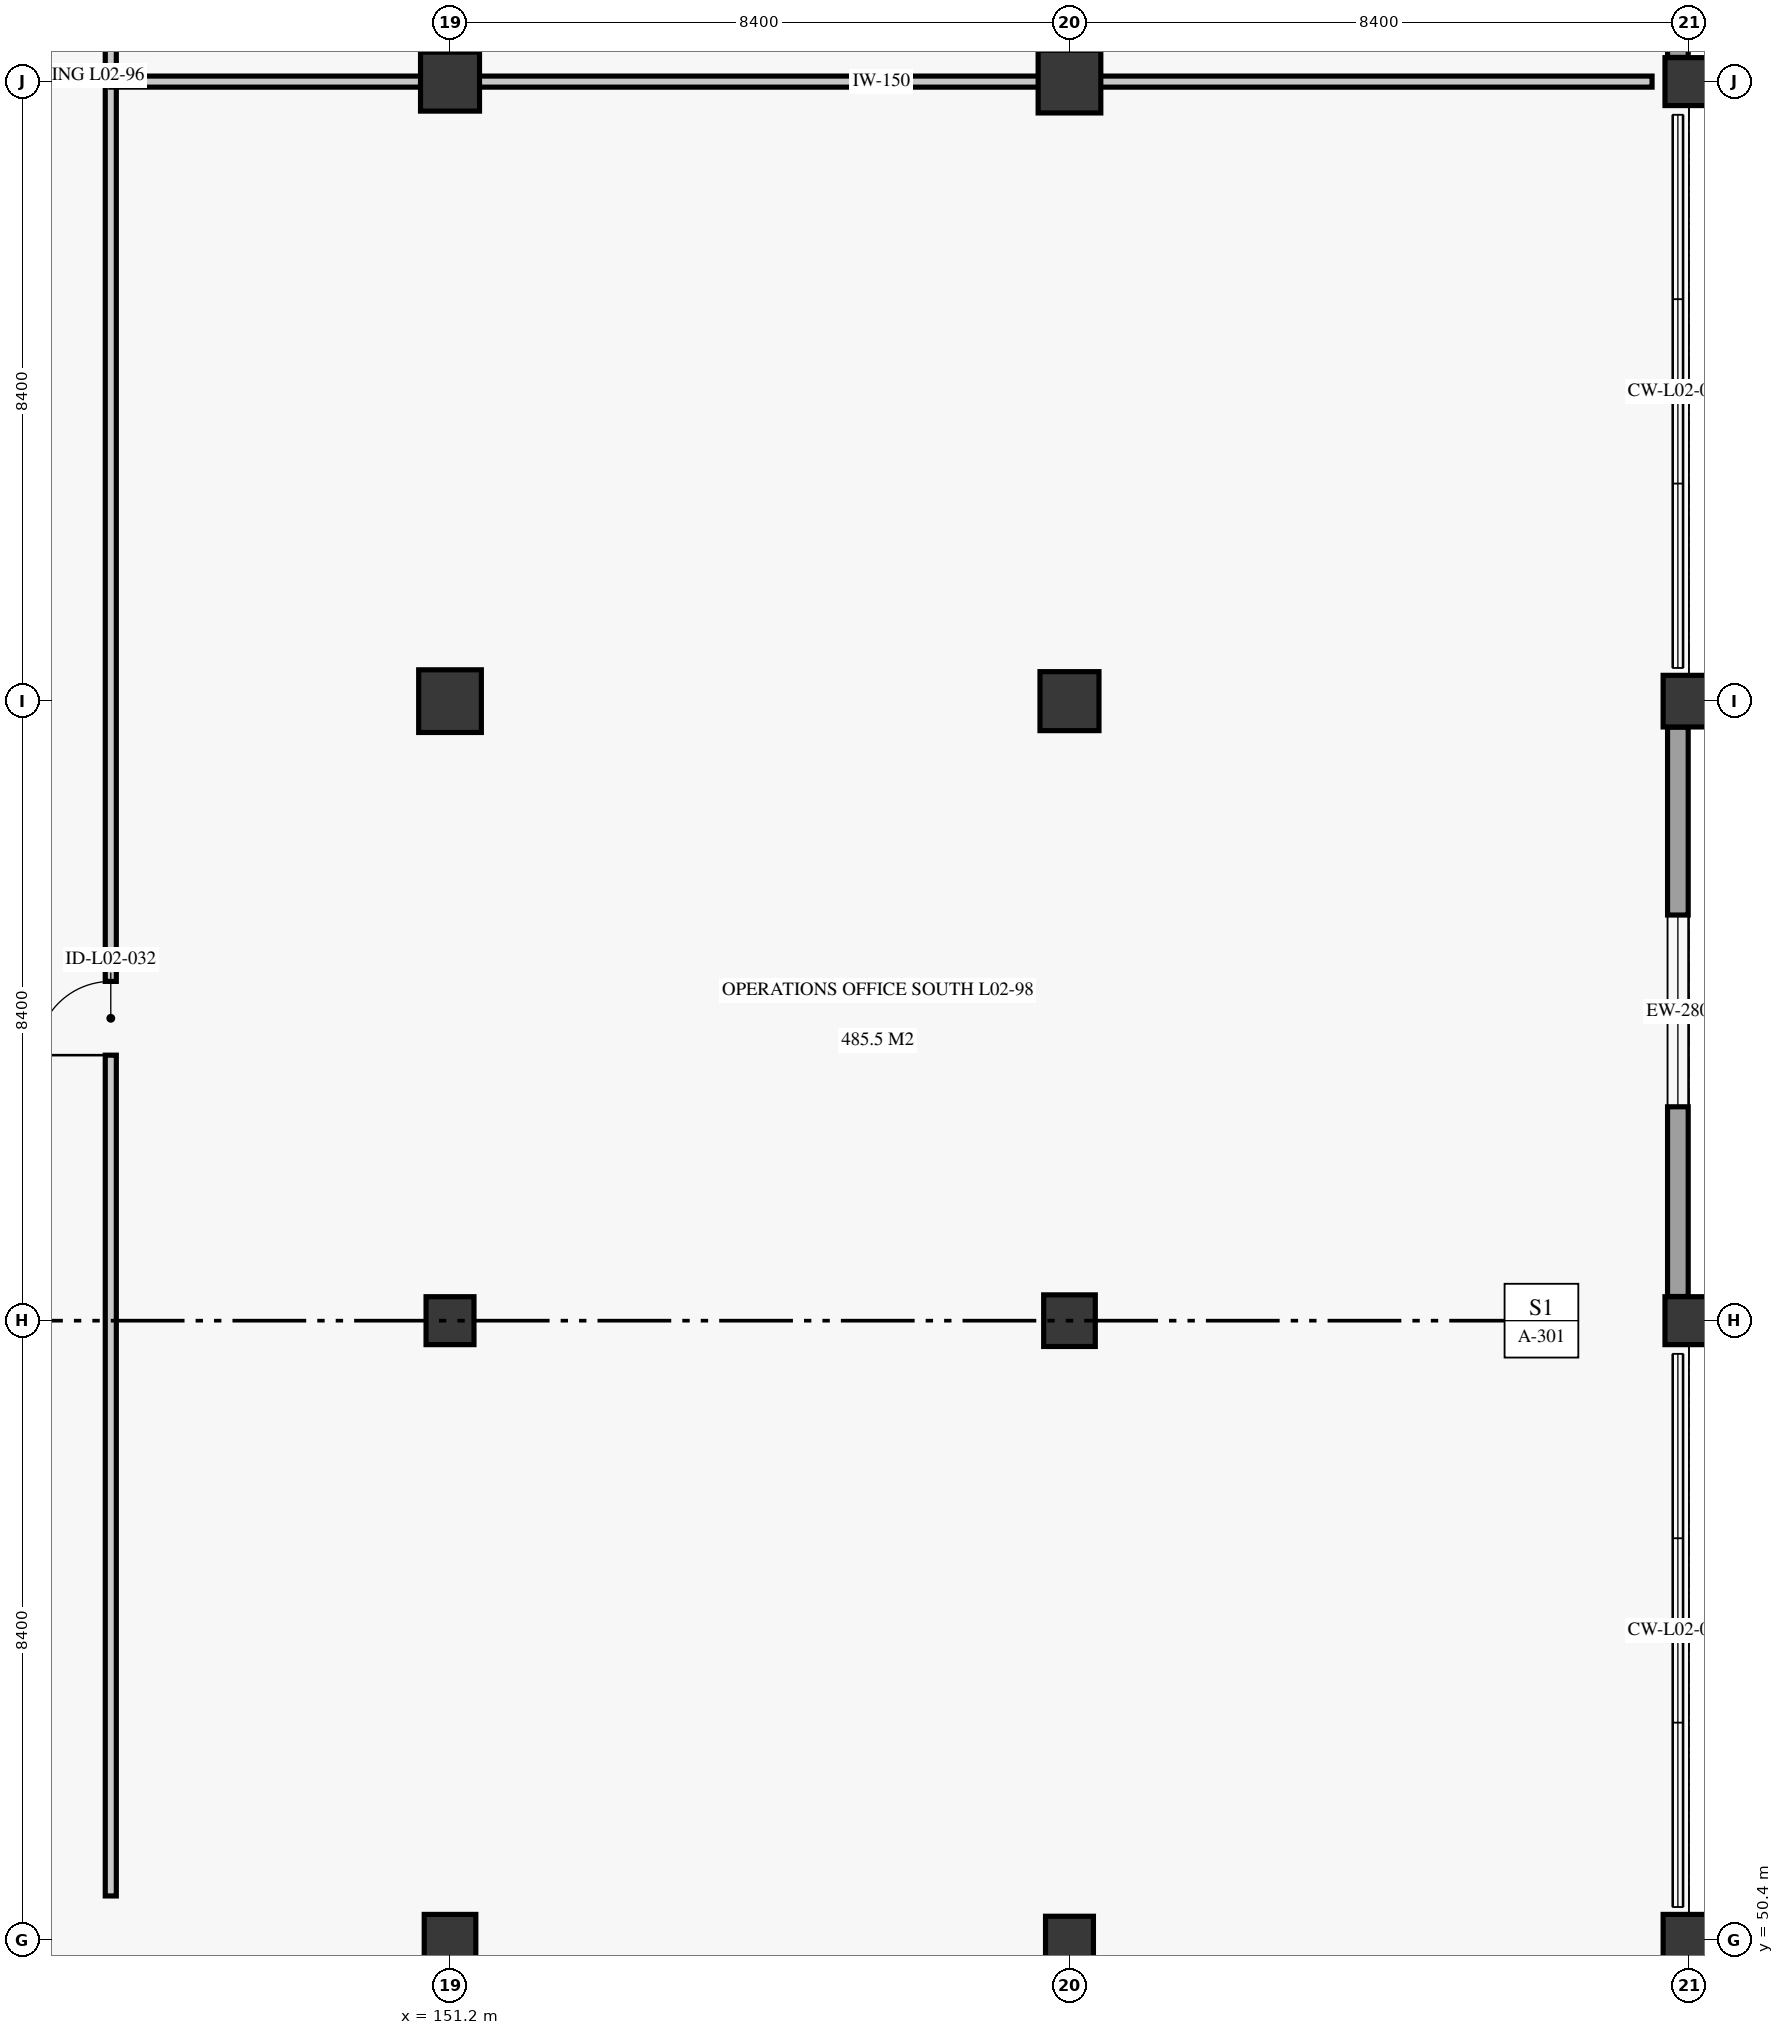
"""IFC4 building model, lengths in metres.
Left out: names, types, materials, properties, quantities, classifications, styles, units other than length and angle.
Written with IfcOpenShell. Run it as: python <this file> out.ifc"""

import sys

from ifc_helpers import new_model, si_unit, direction, frame, frame_2d, origin, origin_2d, place, context, subcontext, project, spatial, rectangle, extrude, element, fill, save


model = new_model("IFC4")
c1 = context("Model", 3, precision=1e-05, world=origin(), true_north=direction((0.0, 1.0)))
c2 = subcontext(c1, "Body", "Model", "MODEL_VIEW")
j1 = project(units=[si_unit("LENGTHUNIT", "METRE"), si_unit("PLANEANGLEUNIT", "RADIAN")], contexts=[c1])
p1 = place(None, origin())
s1 = spatial("IfcSite", under=j1, at=p1, CompositionType="ELEMENT")
p2 = place(p1, origin())
s2 = spatial("IfcBuilding", under=s1, at=p2, CompositionType="ELEMENT")
p3 = place(p2, frame((0.0, 0.0, 6.0)))
s3 = spatial("IfcBuildingStorey", under=s2, at=p3, CompositionType="ELEMENT", Elevation=6.0)
p4 = place(p3, frame((151.2, 50.4, 0.0), z_axis=(0.0, 0.0, 1.0), x_axis=(1.0, 0.0, 0.0)))
e1 = element("IfcColumn", 1, at=p4, inside=s3, PredefinedType="COLUMN", context=c2, shape_type="SweptSolid", body=[
    extrude(rectangle(XDim=0.7, YDim=0.7, at=origin_2d()), origin(), (0.0, 0.0, 1.0), 5.1),
])
p5 = place(p3, frame((151.2, 58.8, 0.0), z_axis=(0.0, 0.0, 1.0), x_axis=(1.0, 0.0, 0.0)))
e2 = element("IfcColumn", 2, at=p5, inside=s3, PredefinedType="COLUMN", context=c2, shape_type="SweptSolid", body=[
    extrude(rectangle(XDim=0.65, YDim=0.65, at=origin_2d()), origin(), (0.0, 0.0, 1.0), 5.1),
])
p6 = place(p3, frame((151.2, 67.2, 0.0), z_axis=(0.0, 0.0, 1.0), x_axis=(1.0, 0.0, 0.0)))
e3 = element("IfcColumn", 3, at=p6, inside=s3, PredefinedType="COLUMN", context=c2, shape_type="SweptSolid", body=[
    extrude(rectangle(XDim=0.85, YDim=0.85, at=origin_2d()), origin(), (0.0, 0.0, 1.0), 5.1),
])
p7 = place(p3, frame((151.2, 75.6, 0.0), z_axis=(0.0, 0.0, 1.0), x_axis=(1.0, 0.0, 0.0)))
e4 = element("IfcColumn", 4, at=p7, inside=s3, PredefinedType="COLUMN", context=c2, shape_type="SweptSolid", body=[
    extrude(rectangle(XDim=0.8, YDim=0.8, at=origin_2d()), origin(), (0.0, 0.0, 1.0), 5.1),
])
p8 = place(p3, frame((159.6, 50.4, 0.0), z_axis=(0.0, 0.0, 1.0), x_axis=(1.0, 0.0, 0.0)))
e5 = element("IfcColumn", 5, at=p8, inside=s3, PredefinedType="COLUMN", context=c2, shape_type="SweptSolid", body=[
    extrude(rectangle(XDim=0.65, YDim=0.65, at=origin_2d()), origin(), (0.0, 0.0, 1.0), 5.1),
])
p9 = place(p3, frame((159.6, 58.8, 0.0), z_axis=(0.0, 0.0, 1.0), x_axis=(1.0, 0.0, 0.0)))
e6 = element("IfcColumn", 6, at=p9, inside=s3, PredefinedType="COLUMN", context=c2, shape_type="SweptSolid", body=[
    extrude(rectangle(XDim=0.7, YDim=0.7, at=origin_2d()), origin(), (0.0, 0.0, 1.0), 5.1),
])
p10 = place(p3, frame((159.6, 67.2, 0.0), z_axis=(0.0, 0.0, 1.0), x_axis=(1.0, 0.0, 0.0)))
e7 = element("IfcColumn", 7, at=p10, inside=s3, PredefinedType="COLUMN", context=c2, shape_type="SweptSolid", body=[
    extrude(rectangle(XDim=0.8, YDim=0.8, at=origin_2d()), origin(), (0.0, 0.0, 1.0), 5.1),
])
p11 = place(p3, frame((159.6, 75.6, 0.0), z_axis=(0.0, 0.0, 1.0), x_axis=(1.0, 0.0, 0.0)))
e8 = element("IfcColumn", 8, at=p11, inside=s3, PredefinedType="COLUMN", context=c2, shape_type="SweptSolid", body=[
    extrude(rectangle(XDim=0.85, YDim=0.85, at=origin_2d()), origin(), (0.0, 0.0, 1.0), 5.1),
])
p12 = place(p3, frame((168.0, 50.4, 0.0), z_axis=(0.0, 0.0, 1.0), x_axis=(1.0, 0.0, 0.0)))
e9 = element("IfcColumn", 9, at=p12, inside=s3, PredefinedType="COLUMN", context=c2, shape_type="SweptSolid", body=[
    extrude(rectangle(XDim=0.7, YDim=0.7, at=origin_2d()), origin(), (0.0, 0.0, 1.0), 5.1),
])
p13 = place(p3, frame((168.0, 58.8, 0.0), z_axis=(0.0, 0.0, 1.0), x_axis=(1.0, 0.0, 0.0)))
e10 = element("IfcColumn", 10, at=p13, inside=s3, PredefinedType="COLUMN", context=c2, shape_type="SweptSolid", body=[
    extrude(rectangle(XDim=0.65, YDim=0.65, at=origin_2d()), origin(), (0.0, 0.0, 1.0), 5.1),
])
p14 = place(p3, frame((168.0, 67.2, 0.0), z_axis=(0.0, 0.0, 1.0), x_axis=(1.0, 0.0, 0.0)))
e11 = element("IfcColumn", 11, at=p14, inside=s3, PredefinedType="COLUMN", context=c2, shape_type="SweptSolid", body=[
    extrude(rectangle(XDim=0.7, YDim=0.7, at=origin_2d()), origin(), (0.0, 0.0, 1.0), 5.1),
])
p15 = place(p3, frame((168.0, 75.6, 0.0), z_axis=(0.0, 0.0, 1.0), x_axis=(1.0, 0.0, 0.0)))
e12 = element("IfcColumn", 12, at=p15, inside=s3, PredefinedType="COLUMN", context=c2, shape_type="SweptSolid", body=[
    extrude(rectangle(XDim=0.65, YDim=0.65, at=origin_2d()), origin(), (0.0, 0.0, 1.0), 5.1),
])
p16 = place(p3, frame((167.85, 59.128, 0.0), z_axis=(0.0, 0.0, 1.0), x_axis=(0.0, 1.0, 0.0)))
e13 = element("IfcWall", 13, at=p16, inside=s3, PredefinedType="SOLIDWALL", context=c2, shape_type="SweptSolid", body=[
    extrude(rectangle(XDim=7.72, YDim=0.28, at=frame_2d((3.86, 0.0))), origin(), (0.0, 0.0, 1.0), 4.38),
])
p17 = place(p16, frame((2.572, 0.0, 1.0)))
e14 = element("IfcOpeningElement", 14, at=p17, cuts=e13, PredefinedType="OPENING", context=c2, shape_type="SweptSolid", body=[
    extrude(rectangle(XDim=2.6, YDim=2.1, at=frame_2d((1.3, 1.05))), frame((0.0, 0.15, 0.0), z_axis=(0.0, -1.0, 0.0), x_axis=(1.0, 0.0, 0.0)), (0.0, 0.0, 1.0), 0.3),
])
p18 = place(p3, frame((167.85, 75.928, 0.0), z_axis=(0.0, 0.0, 1.0), x_axis=(0.0, 1.0, 0.0)))
e15 = element("IfcWall", 15, at=p18, inside=s3, PredefinedType="SOLIDWALL", context=c2, shape_type="SweptSolid", body=[
    extrude(rectangle(XDim=7.72, YDim=0.28, at=frame_2d((3.86, 0.0))), origin(), (0.0, 0.0, 1.0), 4.38),
])
p19 = place(p18, frame((2.572, 0.0, 1.0)))
e16 = element("IfcOpeningElement", 16, at=p19, cuts=e15, PredefinedType="OPENING", context=c2, shape_type="SweptSolid", body=[
    extrude(rectangle(XDim=2.6, YDim=2.1, at=frame_2d((1.3, 1.05))), frame((0.0, 0.15, 0.0), z_axis=(0.0, -1.0, 0.0), x_axis=(1.0, 0.0, 0.0)), (0.0, 0.0, 1.0), 0.3),
])
p20 = place(p3, frame((146.6, 51.0, 0.0), z_axis=(0.0, 0.0, 1.0), x_axis=(0.0, 1.0, 0.0)))
e17 = element("IfcWall", 17, at=p20, inside=s3, PredefinedType="PARTITIONING", context=c2, shape_type="SweptSolid", body=[
    extrude(rectangle(XDim=49.0, YDim=0.15, at=frame_2d((24.5, 0.0))), origin(), (0.0, 0.0, 1.0), 4.72),
])
p21 = place(p20, frame((11.4, 0.0, 0.0)))
e18 = element("IfcOpeningElement", 18, at=p21, cuts=e17, PredefinedType="OPENING", context=c2, shape_type="SweptSolid", body=[
    extrude(rectangle(XDim=1.0, YDim=2.1, at=frame_2d((0.5, 1.05))), frame((0.0, 0.085, 0.0), z_axis=(0.0, -1.0, 0.0), x_axis=(1.0, 0.0, 0.0)), (0.0, 0.0, 1.0), 0.17),
])
p22 = place(p20, frame((36.6, 0.0, 0.0)))
e19 = element("IfcOpeningElement", 19, at=p22, cuts=e17, PredefinedType="OPENING", context=c2, shape_type="SweptSolid", body=[
    extrude(rectangle(XDim=1.0, YDim=2.1, at=frame_2d((0.5, 1.05))), frame((0.0, 0.085, 0.0), z_axis=(0.0, -1.0, 0.0), x_axis=(1.0, 0.0, 0.0)), (0.0, 0.0, 1.0), 0.17),
])
p23 = place(p3, frame((146.6, 75.6, 0.0), z_axis=(0.0, 0.0, 1.0), x_axis=(1.0, 0.0, 0.0)))
e20 = element("IfcWall", 20, at=p23, inside=s3, PredefinedType="PARTITIONING", context=c2, shape_type="SweptSolid", body=[
    extrude(rectangle(XDim=20.9, YDim=0.15, at=frame_2d((10.45, 0.0))), origin(), (0.0, 0.0, 1.0), 4.72),
])
p24 = place(p17, origin())
e21 = element("IfcWindow", 21, at=p24, inside=s3, PartitioningType="SINGLE_PANEL", PredefinedType="WINDOW", context=c2, shape_type="SweptSolid", body=[
    extrude(rectangle(XDim=2.6, YDim=2.1, at=frame_2d((1.3, 1.05))), frame((0.0, 0.03, 0.0), z_axis=(0.0, -1.0, 0.0), x_axis=(1.0, 0.0, 0.0)), (0.0, 0.0, 1.0), 0.06),
])
fill(e14, e21)
p25 = place(p21, origin())
e22 = element("IfcDoor", 22, at=p25, inside=s3, OperationType="SINGLE_SWING_LEFT", PredefinedType="DOOR", context=c2, shape_type="SweptSolid", body=[
    extrude(rectangle(XDim=1.0, YDim=2.1, at=frame_2d((0.5, 1.05))), frame((0.0, 0.025, 0.0), z_axis=(0.0, -1.0, 0.0), x_axis=(1.0, 0.0, 0.0)), (0.0, 0.0, 1.0), 0.05),
])
fill(e18, e22)
save(model, sys.argv[1])
